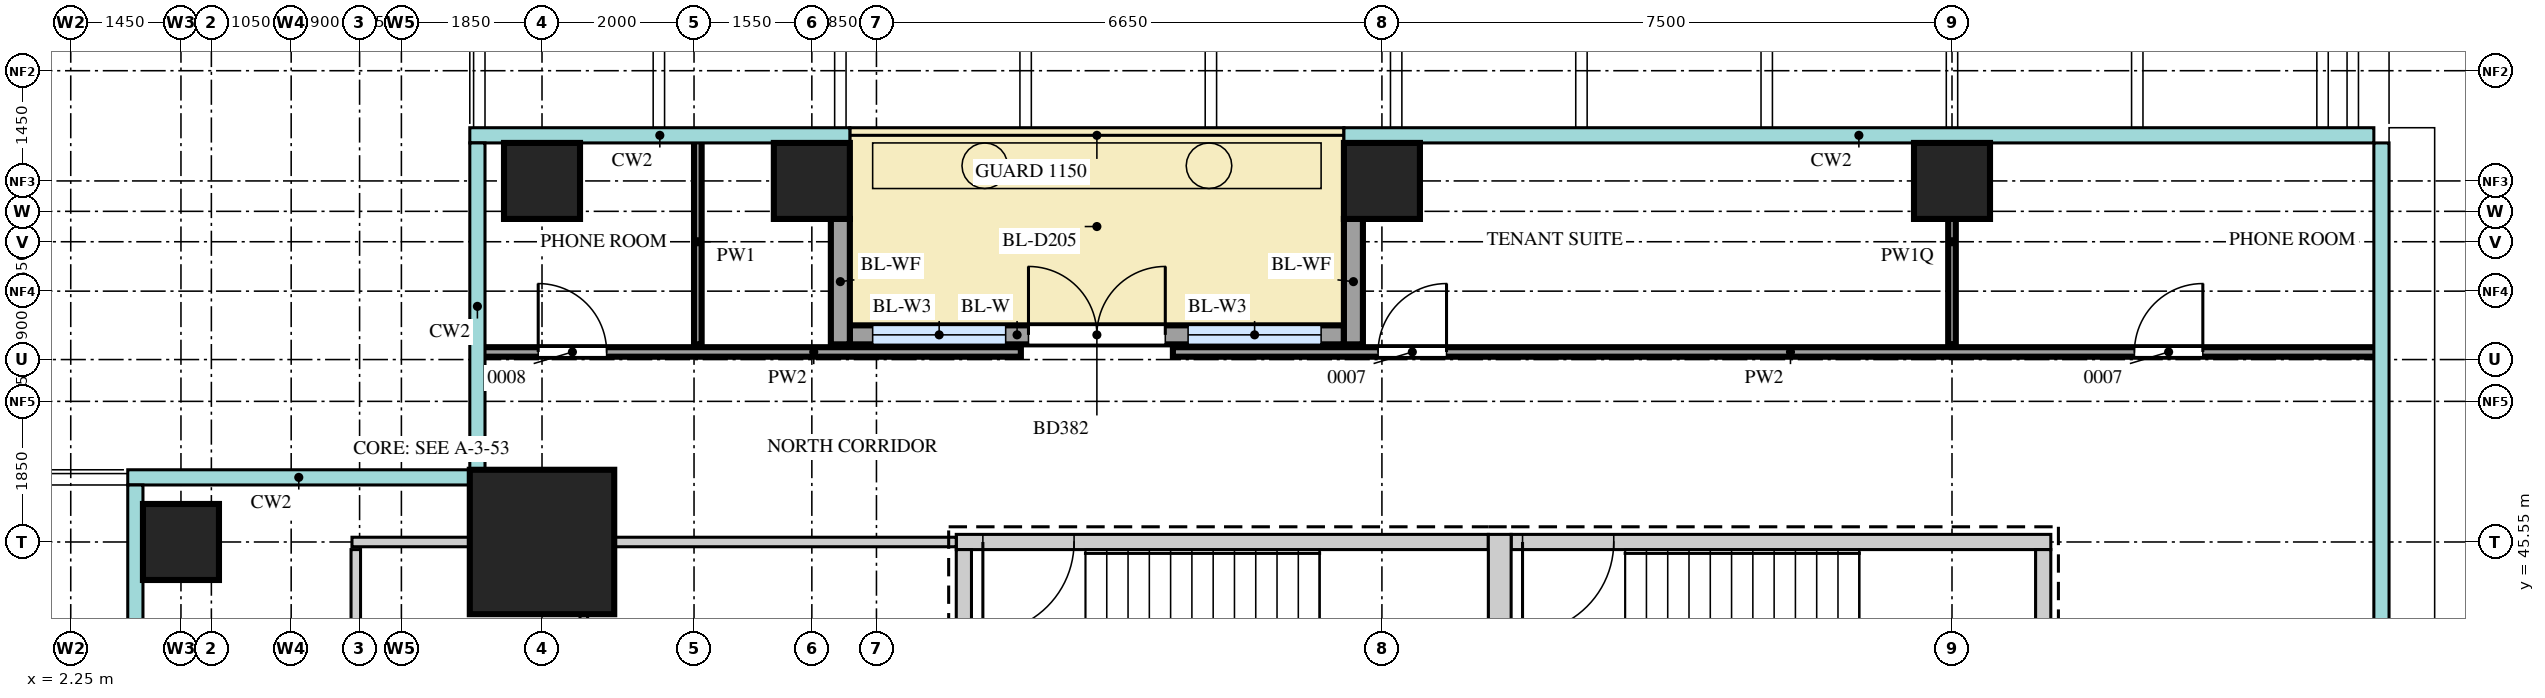
"""IFC4 building model, lengths in metres.
Left out: names, types, materials, properties, quantities, classifications, styles, units other than length and angle.
Written with IfcOpenShell. Run it as: python <this file> out.ifc"""

import sys

from ifc_helpers import new_model, si_unit, direction, frame, frame_2d, origin, origin_2d, place, context, subcontext, project, spatial, rectangle, extrude, source, transform, mapped, element, fill, save


model = new_model("IFC4")
c1 = context("Model", 3, precision=1e-05, world=origin(), true_north=direction((0.0, 1.0)))
c2 = subcontext(c1, "Body", "Model", "MODEL_VIEW")
j1 = project(units=[si_unit("LENGTHUNIT", "METRE"), si_unit("PLANEANGLEUNIT", "RADIAN")], contexts=[c1])
p1 = place(None, origin())
s1 = spatial("IfcSite", under=j1, at=p1, CompositionType="ELEMENT")
p2 = place(p1, origin())
s2 = spatial("IfcBuilding", under=s1, at=p2, CompositionType="ELEMENT")
p3 = place(p2, frame((0.0, 0.0, 176.7)))
s3 = spatial("IfcBuildingStorey", under=s2, at=p3, CompositionType="ELEMENT", Elevation=176.7)
m1 = source(origin(), c2, "Body", "SweptSolid", [
    extrude(rectangle(XDim=7.0, YDim=0.2, at=frame_2d((3.5, 0.0))), origin(), (0.0, 0.0, 1.0), 3.75),
])
p4 = place(p3, frame((13.9, 45.55, 0.0), z_axis=(0.0, 0.0, 1.0), x_axis=(1.0, 0.0, 0.0)))
e1 = element("IfcWall", 1, at=p4, inside=s3, PredefinedType="SHEAR", context=c2, shape_type="MappedRepresentation", body=[
    mapped(m1, transform((0.0, 0.0, 0.0))),
])
m2 = source(origin(), c2, "Body", "SweptSolid", [
    extrude(rectangle(XDim=1.2, YDim=2.1, at=frame_2d((0.6, 1.05))), frame((0.0, 0.11, 0.0), z_axis=(0.0, -1.0, 0.0), x_axis=(1.0, 0.0, 0.0)), (0.0, 0.0, 1.0), 0.22),
])
p5 = place(p4, frame((0.35, 0.0, 0.0)))
e2 = element("IfcOpeningElement", 2, at=p5, cuts=e1, PredefinedType="OPENING", context=c2, shape_type="MappedRepresentation", body=[
    mapped(m2, transform((0.0, 0.0, 0.0))),
])
m3 = source(origin(), c2, "Body", "SweptSolid", [
    extrude(rectangle(XDim=7.1, YDim=0.2, at=frame_2d((3.55, 0.0))), origin(), (0.0, 0.0, 1.0), 3.75),
])
p6 = place(p3, frame((21.2, 45.55, 0.0), z_axis=(0.0, 0.0, 1.0), x_axis=(1.0, 0.0, 0.0)))
e3 = element("IfcWall", 3, at=p6, inside=s3, PredefinedType="SHEAR", context=c2, shape_type="MappedRepresentation", body=[
    mapped(m3, transform((0.0, 0.0, 0.0))),
])
p7 = place(p6, frame((0.15, 0.0, 0.0)))
e4 = element("IfcOpeningElement", 4, at=p7, cuts=e3, PredefinedType="OPENING", context=c2, shape_type="MappedRepresentation", body=[
    mapped(m2, transform((0.0, 0.0, 0.0))),
])
m4 = source(origin(), c2, "Body", "SweptSolid", [
    extrude(rectangle(XDim=3.75, YDim=0.3, at=frame_2d((1.875, 0.0))), origin(), (0.0, 0.0, 1.0), 3.75),
])
p8 = place(p3, frame((21.05, 41.9, 0.0), z_axis=(0.0, 0.0, 1.0), x_axis=(0.0, 1.0, 0.0)))
e5 = element("IfcWall", 5, at=p8, inside=s3, PredefinedType="SHEAR", context=c2, shape_type="MappedRepresentation", body=[
    mapped(m4, transform((0.0, 0.0, 0.0))),
])
m5 = source(origin(), c2, "Body", "SweptSolid", [
    extrude(rectangle(XDim=3.35, YDim=0.2, at=frame_2d((1.675, 0.0))), origin(), (0.0, 0.0, 1.0), 3.75),
])
for number, where, z_axis, x_axis in (
    (6, (14.0, 42.1, 0.0), (0.0, 0.0, 1.0), (0.0, 1.0, 0.0)),
    (7, (28.2, 42.1, 0.0), (0.0, 0.0, 1.0), (0.0, 1.0, 0.0)),
):
    element("IfcWall", number, at=place(p3, frame(where, z_axis=z_axis, x_axis=x_axis)), inside=s3, PredefinedType="SHEAR", context=c2, shape_type="MappedRepresentation", body=[
        mapped(m5, transform((0.0, 0.0, 0.0))),
    ])
m6 = source(origin(), c2, "Body", "SweptSolid", [
    extrude(rectangle(XDim=1.9, YDim=1.9, at=origin_2d()), origin(), (0.0, 0.0, 1.0), 4.0),
])
p9 = place(p3, frame((8.45, 45.55, 0.0), z_axis=(0.0, 0.0, 1.0), x_axis=(1.0, 0.0, 0.0)))
e8 = element("IfcColumn", 8, at=p9, inside=s3, PredefinedType="COLUMN", context=c2, shape_type="MappedRepresentation", body=[
    mapped(m6, transform((0.0, 0.0, 0.0))),
])
m7 = source(origin(), c2, "Body", "SweptSolid", [
    extrude(rectangle(XDim=1.0, YDim=1.0, at=origin_2d()), origin(), (0.0, 0.0, 1.0), 3.75),
])
for number, where, z_axis, x_axis in (
    (9, (8.45, 50.3, 0.0), (0.0, 0.0, 1.0), (1.0, 0.0, 0.0)),
    (10, (12.0, 50.3, 0.0), (0.0, 0.0, 1.0), (1.0, 0.0, 0.0)),
    (11, (19.5, 50.3, 0.0), (0.0, 0.0, 1.0), (1.0, 0.0, 0.0)),
    (12, (27.0, 50.3, 0.0), (0.0, 0.0, 1.0), (1.0, 0.0, 0.0)),
    (13, (3.7, 45.55, 0.0), (0.0, 0.0, 1.0), (1.0, 0.0, 0.0)),
):
    element("IfcColumn", number, at=place(p3, frame(where, z_axis=z_axis, x_axis=x_axis)), inside=s3, PredefinedType="COLUMN", context=c2, shape_type="MappedRepresentation", body=[
        mapped(m7, transform((0.0, 0.0, 0.0))),
    ])
m8 = source(origin(), c2, "Body", "SweptSolid", [
    extrude(rectangle(XDim=6.5, YDim=0.25, at=frame_2d((3.25, 0.0))), origin(), (0.0, 0.0, 1.0), 3.75),
])
p10 = place(p3, frame((12.5, 48.275, 0.0), z_axis=(0.0, 0.0, 1.0), x_axis=(1.0, 0.0, 0.0)))
e14 = element("IfcWall", 14, at=p10, inside=s3, PredefinedType="SOLIDWALL", context=c2, shape_type="MappedRepresentation", body=[
    mapped(m8, transform((0.0, 0.0, 0.0))),
])
m9 = source(origin(), c2, "Body", "SweptSolid", [
    extrude(rectangle(XDim=1.75, YDim=2.4, at=frame_2d((0.875, 1.2))), frame((0.0, 0.135, 0.0), z_axis=(0.0, -1.0, 0.0), x_axis=(1.0, 0.0, 0.0)), (0.0, 0.0, 1.0), 0.27),
])
p11 = place(p10, frame((0.3, 0.0, 0.0)))
e15 = element("IfcOpeningElement", 15, at=p11, cuts=e14, PredefinedType="OPENING", context=c2, shape_type="MappedRepresentation", body=[
    mapped(m9, transform((0.0, 0.0, 0.0))),
])
p12 = place(p10, frame((4.45, 0.0, 0.0)))
e16 = element("IfcOpeningElement", 16, at=p12, cuts=e14, PredefinedType="OPENING", context=c2, shape_type="MappedRepresentation", body=[
    mapped(m9, transform((0.0, 0.0, 0.0))),
])
m10 = source(origin(), c2, "Body", "SweptSolid", [
    extrude(rectangle(XDim=1.8, YDim=2.4, at=frame_2d((0.9, 1.2))), frame((0.0, 0.135, 0.0), z_axis=(0.0, -1.0, 0.0), x_axis=(1.0, 0.0, 0.0)), (0.0, 0.0, 1.0), 0.27),
])
p13 = place(p10, frame((2.35, 0.0, 0.0)))
e17 = element("IfcOpeningElement", 17, at=p13, cuts=e14, PredefinedType="OPENING", context=c2, shape_type="MappedRepresentation", body=[
    mapped(m10, transform((0.0, 0.0, 0.0))),
])
m11 = source(origin(), c2, "Body", "SweptSolid", [
    extrude(rectangle(XDim=1.65, YDim=0.25, at=frame_2d((0.825, 0.0))), origin(), (0.0, 0.0, 1.0), 3.45),
])
for number, where, z_axis, x_axis in (
    (18, (12.375, 49.8, 0.0), (0.0, 0.0, 1.0), (0.0, -1.0, 0.0)),
    (19, (19.125, 49.8, 0.0), (0.0, 0.0, 1.0), (0.0, -1.0, 0.0)),
):
    element("IfcWall", number, at=place(p3, frame(where, z_axis=z_axis, x_axis=x_axis)), inside=s3, PredefinedType="SOLIDWALL", context=c2, shape_type="MappedRepresentation", body=[
        mapped(m11, transform((0.0, 0.0, 0.0))),
    ])
m12 = source(origin(), c2, "Body", "SweptSolid", [
    extrude(rectangle(XDim=3.45, YDim=0.125, at=frame_2d((1.725, 0.0))), origin(), (0.0, 0.0, 1.0), 3.8),
])
p14 = place(p3, frame((6.0, 42.0, 0.0), z_axis=(0.0, 0.0, 1.0), x_axis=(0.0, 1.0, 0.0)))
e20 = element("IfcWall", 20, at=p14, inside=s3, PredefinedType="PARTITIONING", context=c2, shape_type="MappedRepresentation", body=[
    mapped(m12, transform((0.0, 0.0, 0.0))),
])
m13 = source(origin(), c2, "Body", "SweptSolid", [
    extrude(rectangle(XDim=0.9, YDim=2.1, at=frame_2d((0.45, 1.05))), frame((0.0, 0.073, 0.0), z_axis=(0.0, -1.0, 0.0), x_axis=(1.0, 0.0, 0.0)), (0.0, 0.0, 1.0), 0.145),
])
p15 = place(p14, frame((1.15, 0.0, 0.0)))
e21 = element("IfcOpeningElement", 21, at=p15, cuts=e20, PredefinedType="OPENING", context=c2, shape_type="MappedRepresentation", body=[
    mapped(m13, transform((0.0, 0.0, 0.0))),
])
m14 = source(origin(), c2, "Body", "SweptSolid", [
    extrude(rectangle(XDim=3.45, YDim=0.1, at=frame_2d((1.725, 0.0))), origin(), (0.0, 0.0, 1.0), 3.8),
])
p16 = place(p3, frame((9.0, 42.0, 0.0), z_axis=(0.0, 0.0, 1.0), x_axis=(0.0, 1.0, 0.0)))
e22 = element("IfcWall", 22, at=p16, inside=s3, PredefinedType="PARTITIONING", context=c2, shape_type="MappedRepresentation", body=[
    mapped(m14, transform((0.0, 0.0, 0.0))),
])
m15 = source(origin(), c2, "Body", "SweptSolid", [
    extrude(rectangle(XDim=7.95, YDim=0.125, at=frame_2d((3.975, 0.0))), origin(), (0.0, 0.0, 1.0), 3.25),
])
p17 = place(p3, frame((5.95, 45.55, 0.0), z_axis=(0.0, 0.0, 1.0), x_axis=(1.0, 0.0, 0.0)))
e23 = element("IfcWall", 23, at=p17, inside=s3, PredefinedType="PARTITIONING", context=c2, shape_type="MappedRepresentation", body=[
    mapped(m15, transform((0.0, 0.0, 0.0))),
])
m16 = source(origin(), c2, "Body", "SweptSolid", [
    extrude(rectangle(XDim=2.7, YDim=0.1, at=frame_2d((1.35, 0.0))), origin(), (0.0, 0.0, 1.0), 3.8),
])
p18 = place(p3, frame((10.5, 48.15, 0.0), z_axis=(0.0, 0.0, 1.0), x_axis=(0.0, 1.0, 0.0)))
e24 = element("IfcWall", 24, at=p18, inside=s3, PredefinedType="PARTITIONING", context=c2, shape_type="MappedRepresentation", body=[
    mapped(m16, transform((0.0, 0.0, 0.0))),
])
m17 = source(origin(), c2, "Body", "SweptSolid", [
    extrude(rectangle(XDim=2.7, YDim=0.1, at=frame_2d((1.35, 0.0))), origin(), (0.0, 0.0, 1.0), 3.42),
])
p19 = place(p3, frame((27.0, 48.15, 0.0), z_axis=(0.0, 0.0, 1.0), x_axis=(0.0, 1.0, 0.0)))
e25 = element("IfcWall", 25, at=p19, inside=s3, PredefinedType="PARTITIONING", context=c2, shape_type="MappedRepresentation", body=[
    mapped(m17, transform((0.0, 0.0, 0.0))),
])
m18 = source(origin(), c2, "Body", "SweptSolid", [
    extrude(rectangle(XDim=7.1, YDim=0.125, at=frame_2d((3.55, 0.0))), origin(), (0.0, 0.0, 1.0), 3.8),
])
p20 = place(p3, frame((7.65, 48.05, 0.0), z_axis=(0.0, 0.0, 1.0), x_axis=(1.0, 0.0, 0.0)))
e26 = element("IfcWall", 26, at=p20, inside=s3, PredefinedType="PARTITIONING", context=c2, shape_type="MappedRepresentation", body=[
    mapped(m18, transform((0.0, 0.0, 0.0))),
])
p21 = place(p20, frame((0.75, 0.0, 0.0)))
e27 = element("IfcOpeningElement", 27, at=p21, cuts=e26, PredefinedType="OPENING", context=c2, shape_type="MappedRepresentation", body=[
    mapped(m13, transform((0.0, 0.0, 0.0))),
])
m19 = source(origin(), c2, "Body", "SweptSolid", [
    extrude(rectangle(XDim=15.85, YDim=0.125, at=frame_2d((7.925, 0.0))), origin(), (0.0, 0.0, 1.0), 3.8),
])
p22 = place(p3, frame((16.75, 48.05, 0.0), z_axis=(0.0, 0.0, 1.0), x_axis=(1.0, 0.0, 0.0)))
e28 = element("IfcWall", 28, at=p22, inside=s3, PredefinedType="PARTITIONING", context=c2, shape_type="MappedRepresentation", body=[
    mapped(m19, transform((0.0, 0.0, 0.0))),
])
p23 = place(p22, frame((2.7, 0.0, 0.0)))
e29 = element("IfcOpeningElement", 29, at=p23, cuts=e28, PredefinedType="OPENING", context=c2, shape_type="MappedRepresentation", body=[
    mapped(m13, transform((0.0, 0.0, 0.0))),
])
p24 = place(p22, frame((12.65, 0.0, 0.0)))
e30 = element("IfcOpeningElement", 30, at=p24, cuts=e28, PredefinedType="OPENING", context=c2, shape_type="MappedRepresentation", body=[
    mapped(m13, transform((0.0, 0.0, 0.0))),
])
m20 = source(origin(), c2, "Body", "SweptSolid", [
    extrude(rectangle(XDim=1.75, YDim=2.4, at=frame_2d((0.875, 1.2))), frame((0.0, 0.03, 0.0), z_axis=(0.0, -1.0, 0.0), x_axis=(1.0, 0.0, 0.0)), (0.0, 0.0, 1.0), 0.06),
])
p25 = place(p11, origin())
e31 = element("IfcWindow", 31, at=p25, inside=s3, PartitioningType="SINGLE_PANEL", PredefinedType="WINDOW", context=c2, shape_type="MappedRepresentation", body=[
    mapped(m20, transform((0.0, 0.0, 0.0))),
])
fill(e15, e31)
p26 = place(p12, origin())
e32 = element("IfcWindow", 32, at=p26, inside=s3, PartitioningType="SINGLE_PANEL", PredefinedType="WINDOW", context=c2, shape_type="MappedRepresentation", body=[
    mapped(m20, transform((0.0, 0.0, 0.0))),
])
fill(e16, e32)
m21 = source(origin(), c2, "Body", "SweptSolid", [
    extrude(rectangle(XDim=1.8, YDim=2.4, at=frame_2d((0.9, 1.2))), frame((0.0, 0.025, 0.0), z_axis=(0.0, -1.0, 0.0), x_axis=(1.0, 0.0, 0.0)), (0.0, 0.0, 1.0), 0.05),
])
p27 = place(p13, origin())
e33 = element("IfcDoor", 33, at=p27, inside=s3, OperationType="DOUBLE_DOOR_DOUBLE_SWING", PredefinedType="DOOR", context=c2, shape_type="MappedRepresentation", body=[
    mapped(m21, transform((0.0, 0.0, 0.0))),
])
fill(e17, e33)
m22 = source(origin(), c2, "Body", "SweptSolid", [
    extrude(rectangle(XDim=0.9, YDim=2.1, at=frame_2d((0.45, 1.05))), frame((0.0, 0.025, 0.0), z_axis=(0.0, -1.0, 0.0), x_axis=(1.0, 0.0, 0.0)), (0.0, 0.0, 1.0), 0.05),
])
p28 = place(p21, origin())
e34 = element("IfcDoor", 34, at=p28, inside=s3, OperationType="SINGLE_SWING_RIGHT", PredefinedType="DOOR", context=c2, shape_type="MappedRepresentation", body=[
    mapped(m22, transform((0.0, 0.0, 0.0))),
])
fill(e27, e34)
p29 = place(p23, origin())
e35 = element("IfcDoor", 35, at=p29, inside=s3, OperationType="SINGLE_SWING_LEFT", PredefinedType="DOOR", context=c2, shape_type="MappedRepresentation", body=[
    mapped(m22, transform((0.0, 0.0, 0.0))),
])
fill(e29, e35)
p30 = place(p24, origin())
e36 = element("IfcDoor", 36, at=p30, inside=s3, OperationType="SINGLE_SWING_LEFT", PredefinedType="DOOR", context=c2, shape_type="MappedRepresentation", body=[
    mapped(m22, transform((0.0, 0.0, 0.0))),
])
fill(e30, e36)
m23 = source(origin(), c2, "Body", "SweptSolid", [
    extrude(rectangle(XDim=1.2, YDim=2.1, at=frame_2d((0.6, 1.05))), frame((0.0, 0.025, 0.0), z_axis=(0.0, -1.0, 0.0), x_axis=(1.0, 0.0, 0.0)), (0.0, 0.0, 1.0), 0.05),
])
p31 = place(p5, origin())
e37 = element("IfcDoor", 37, at=p31, inside=s3, OperationType="SINGLE_SWING_LEFT", PredefinedType="DOOR", context=c2, shape_type="MappedRepresentation", body=[
    mapped(m23, transform((0.0, 0.0, 0.0))),
])
fill(e2, e37)
p32 = place(p7, origin())
e38 = element("IfcDoor", 38, at=p32, inside=s3, OperationType="SINGLE_SWING_LEFT", PredefinedType="DOOR", context=c2, shape_type="MappedRepresentation", body=[
    mapped(m23, transform((0.0, 0.0, 0.0))),
])
fill(e4, e38)
save(model, sys.argv[1])
